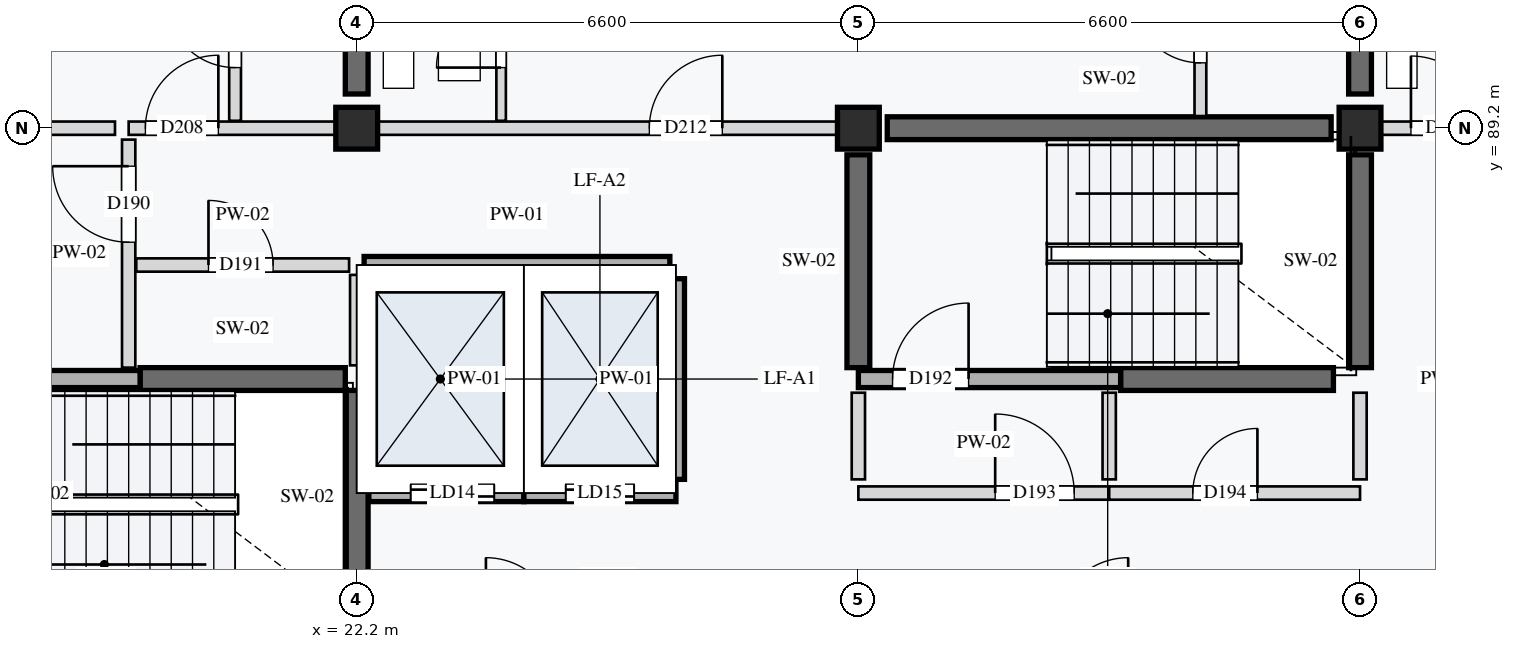
"""IFC4 building model, lengths in metres.
Left out: names, types, materials, properties, quantities, classifications, styles, units other than length and angle.
Written with IfcOpenShell. Run it as: python <this file> out.ifc"""

import sys

from ifc_helpers import new_model, si_unit, direction, frame, frame_2d, origin, origin_2d, place, context, subcontext, project, spatial, rectangle, extrude, element, fill, save


model = new_model("IFC4")
c1 = context("Model", 3, precision=1e-05, world=origin(), true_north=direction((0.0, 1.0)))
c2 = subcontext(c1, "Body", "Model", "MODEL_VIEW")
j1 = project(units=[si_unit("LENGTHUNIT", "METRE"), si_unit("PLANEANGLEUNIT", "RADIAN")], contexts=[c1])
p1 = place(None, origin())
s1 = spatial("IfcSite", under=j1, at=p1, CompositionType="ELEMENT")
p2 = place(p1, origin())
s2 = spatial("IfcBuilding", under=s1, at=p2, CompositionType="ELEMENT")
p3 = place(p2, frame((0.0, 0.0, 21.2)))
s3 = spatial("IfcBuildingStorey", under=s2, at=p3, CompositionType="ELEMENT", Elevation=21.2)
for number, where, z_axis, x_axis in (
    (1, (22.2, 89.2, 0.0), (0.0, 0.0, 1.0), (1.0, 0.0, 0.0)),
    (2, (28.8, 89.2, 0.0), (0.0, 0.0, 1.0), (1.0, 0.0, 0.0)),
    (3, (35.4, 89.2, 0.0), (0.0, 0.0, 1.0), (1.0, 0.0, 0.0)),
):
    element("IfcColumn", number, at=place(p3, frame(where, z_axis=z_axis, x_axis=x_axis)), inside=s3, PredefinedType="COLUMN", context=c2, shape_type="SweptSolid", body=[
        extrude(rectangle(XDim=0.55, YDim=0.55, at=origin_2d()), origin(), (0.0, 0.0, 1.0), 3.2),
    ])
p4 = place(p3, frame((19.35, 85.9, 0.0), z_axis=(0.0, 0.0, 1.0), x_axis=(1.0, 0.0, 0.0)))
e4 = element("IfcWall", 4, at=p4, inside=s3, PredefinedType="SHEAR", context=c2, shape_type="SweptSolid", body=[
    extrude(rectangle(XDim=2.7, YDim=0.3, at=frame_2d((1.35, 0.0))), origin(), (0.0, 0.0, 1.0), 2.96),
])
p5 = place(p3, frame((22.2, 82.95, 0.0), z_axis=(0.0, 0.0, 1.0), x_axis=(0.0, 1.0, 0.0)))
e5 = element("IfcWall", 5, at=p5, inside=s3, PredefinedType="SHEAR", context=c2, shape_type="SweptSolid", body=[
    extrude(rectangle(XDim=2.8, YDim=0.3, at=frame_2d((1.4, 0.0))), origin(), (0.0, 0.0, 1.0), 2.96),
])
p6 = place(p3, frame((29.18, 89.2, 0.0), z_axis=(0.0, 0.0, 1.0), x_axis=(1.0, 0.0, 0.0)))
e6 = element("IfcWall", 6, at=p6, inside=s3, PredefinedType="SHEAR", context=c2, shape_type="SweptSolid", body=[
    extrude(rectangle(XDim=5.84, YDim=0.3, at=frame_2d((2.92, 0.0))), origin(), (0.0, 0.0, 1.0), 2.96),
])
for number, where, z_axis, x_axis in (
    (7, (32.25, 85.9, 0.0), (0.0, 0.0, 1.0), (1.0, 0.0, 0.0)),
    (8, (28.8, 86.05, 0.0), (0.0, 0.0, 1.0), (0.0, 1.0, 0.0)),
    (9, (35.4, 86.05, 0.0), (0.0, 0.0, 1.0), (0.0, 1.0, 0.0)),
):
    element("IfcWall", number, at=place(p3, frame(where, z_axis=z_axis, x_axis=x_axis)), inside=s3, PredefinedType="SHEAR", context=c2, shape_type="SweptSolid", body=[
        extrude(rectangle(XDim=2.8, YDim=0.3, at=frame_2d((1.4, 0.0))), origin(), (0.0, 0.0, 1.0), 2.96),
    ])
for number, where, z_axis, x_axis in (
    (10, (22.2, 89.65, 0.0), (0.0, 0.0, 1.0), (0.0, 1.0, 0.0)),
    (11, (35.4, 89.65, 0.0), (0.0, 0.0, 1.0), (0.0, 1.0, 0.0)),
):
    element("IfcWall", number, at=place(p3, frame(where, z_axis=z_axis, x_axis=x_axis)), inside=s3, PredefinedType="SHEAR", context=c2, shape_type="SweptSolid", body=[
        extrude(rectangle(XDim=5.7, YDim=0.3, at=frame_2d((2.85, 0.0))), origin(), (0.0, 0.0, 1.0), 2.96),
    ])
p7 = place(p3, frame((15.75, 85.9, 0.0), z_axis=(0.0, 0.0, 1.0), x_axis=(1.0, 0.0, 0.0)))
e12 = element("IfcWall", 12, at=p7, inside=s3, PredefinedType="STANDARD", context=c2, shape_type="SweptSolid", body=[
    extrude(rectangle(XDim=3.6, YDim=0.225, at=frame_2d((1.8, 0.0))), origin(), (0.0, 0.0, 1.0), 2.96),
])
p8 = place(p7, frame((0.45, 0.0, 0.0)))
e13 = element("IfcOpeningElement", 13, at=p8, cuts=e12, PredefinedType="OPENING", context=c2, shape_type="SweptSolid", body=[
    extrude(rectangle(XDim=1.04, YDim=2.12, at=frame_2d((0.52, 1.06))), frame((0.0, 0.123, 0.0), z_axis=(0.0, -1.0, 0.0), x_axis=(1.0, 0.0, 0.0)), (0.0, 0.0, 1.0), 0.245),
])
p9 = place(p3, frame((19.2, 86.05, 0.0), z_axis=(0.0, 0.0, 1.0), x_axis=(0.0, 1.0, 0.0)))
e14 = element("IfcWall", 14, at=p9, inside=s3, PredefinedType="PARTITIONING", context=c2, shape_type="SweptSolid", body=[
    extrude(rectangle(XDim=3.0, YDim=0.175, at=frame_2d((1.5, 0.0))), origin(), (0.0, 0.0, 1.0), 2.96),
])
p10 = place(p9, frame((1.65, 0.0, 0.0)))
e15 = element("IfcOpeningElement", 15, at=p10, cuts=e14, PredefinedType="OPENING", context=c2, shape_type="SweptSolid", body=[
    extrude(rectangle(XDim=1.0, YDim=2.1, at=frame_2d((0.5, 1.05))), frame((0.0, 0.097, 0.0), z_axis=(0.0, -1.0, 0.0), x_axis=(1.0, 0.0, 0.0)), (0.0, 0.0, 1.0), 0.195),
])
p11 = place(p3, frame((19.3, 87.4, 0.0), z_axis=(0.0, 0.0, 1.0), x_axis=(1.0, 0.0, 0.0)))
e16 = element("IfcWall", 16, at=p11, inside=s3, PredefinedType="PARTITIONING", context=c2, shape_type="SweptSolid", body=[
    extrude(rectangle(XDim=2.8, YDim=0.175, at=frame_2d((1.4, 0.0))), origin(), (0.0, 0.0, 1.0), 2.96),
])
p12 = place(p11, frame((0.95, 0.0, 0.0)))
e17 = element("IfcOpeningElement", 17, at=p12, cuts=e16, PredefinedType="OPENING", context=c2, shape_type="SweptSolid", body=[
    extrude(rectangle(XDim=0.85, YDim=2.0, at=frame_2d((0.425, 1.0))), frame((0.0, 0.097, 0.0), z_axis=(0.0, -1.0, 0.0), x_axis=(1.0, 0.0, 0.0)), (0.0, 0.0, 1.0), 0.195),
])
p13 = place(p3, frame((22.2, 86.08, 0.0), z_axis=(0.0, 0.0, 1.0), x_axis=(0.0, 1.0, 0.0)))
e18 = element("IfcWall", 18, at=p13, inside=s3, PredefinedType="PARTITIONING", context=c2, shape_type="SweptSolid", body=[
    extrude(rectangle(XDim=1.19, YDim=0.175, at=frame_2d((0.595, 0.0))), origin(), (0.0, 0.0, 1.0), 2.96),
])
p14 = place(p3, frame((22.36, 84.4, 0.0), z_axis=(0.0, 0.0, 1.0), x_axis=(1.0, 0.0, 0.0)))
e19 = element("IfcWall", 19, at=p14, inside=s3, PredefinedType="STANDARD", context=c2, shape_type="SweptSolid", body=[
    extrude(rectangle(XDim=2.04, YDim=0.225, at=frame_2d((1.02, 0.0))), origin(), (0.0, 0.0, 1.0), 2.96),
])
p15 = place(p14, frame((0.55, 0.0, 0.0)))
e20 = element("IfcOpeningElement", 20, at=p15, cuts=e19, PredefinedType="OPENING", context=c2, shape_type="SweptSolid", body=[
    extrude(rectangle(XDim=1.1, YDim=2.1, at=frame_2d((0.55, 1.05))), frame((0.0, 0.123, 0.0), z_axis=(0.0, -1.0, 0.0), x_axis=(1.0, 0.0, 0.0)), (0.0, 0.0, 1.0), 0.245),
])
p16 = place(p3, frame((24.4, 84.4, 0.0), z_axis=(0.0, 0.0, 1.0), x_axis=(1.0, 0.0, 0.0)))
e21 = element("IfcWall", 21, at=p16, inside=s3, PredefinedType="STANDARD", context=c2, shape_type="SweptSolid", body=[
    extrude(rectangle(XDim=2.0, YDim=0.225, at=frame_2d((1.0, 0.0))), origin(), (0.0, 0.0, 1.0), 2.96),
])
p17 = place(p16, frame((0.55, 0.0, 0.0)))
e22 = element("IfcOpeningElement", 22, at=p17, cuts=e21, PredefinedType="OPENING", context=c2, shape_type="SweptSolid", body=[
    extrude(rectangle(XDim=0.9, YDim=2.1, at=frame_2d((0.45, 1.05))), frame((0.0, 0.123, 0.0), z_axis=(0.0, -1.0, 0.0), x_axis=(1.0, 0.0, 0.0)), (0.0, 0.0, 1.0), 0.245),
])
p18 = place(p3, frame((22.298, 87.4, 0.0), z_axis=(0.0, 0.0, 1.0), x_axis=(1.0, 0.0, 0.0)))
e23 = element("IfcWall", 23, at=p18, inside=s3, PredefinedType="STANDARD", context=c2, shape_type="SweptSolid", body=[
    extrude(rectangle(XDim=4.022, YDim=0.225, at=frame_2d((2.011, 0.0))), origin(), (0.0, 0.0, 1.0), 2.96),
])
for number, where, z_axis, x_axis in (
    (24, (24.4, 84.58, 0.0), (0.0, 0.0, 1.0), (0.0, 1.0, 0.0)),
    (25, (26.4, 84.58, 0.0), (0.0, 0.0, 1.0), (0.0, 1.0, 0.0)),
):
    element("IfcWall", number, at=place(p3, frame(where, z_axis=z_axis, x_axis=x_axis)), inside=s3, PredefinedType="STANDARD", context=c2, shape_type="SweptSolid", body=[
        extrude(rectangle(XDim=2.64, YDim=0.225, at=frame_2d((1.32, 0.0))), origin(), (0.0, 0.0, 1.0), 2.96),
    ])
p19 = place(p3, frame((28.8, 85.9, 0.0), z_axis=(0.0, 0.0, 1.0), x_axis=(1.0, 0.0, 0.0)))
e26 = element("IfcWall", 26, at=p19, inside=s3, PredefinedType="STANDARD", context=c2, shape_type="SweptSolid", body=[
    extrude(rectangle(XDim=3.45, YDim=0.225, at=frame_2d((1.725, 0.0))), origin(), (0.0, 0.0, 1.0), 2.96),
])
p20 = place(p19, frame((0.45, 0.0, 0.0)))
e27 = element("IfcOpeningElement", 27, at=p20, cuts=e26, PredefinedType="OPENING", context=c2, shape_type="SweptSolid", body=[
    extrude(rectangle(XDim=1.0, YDim=2.16, at=frame_2d((0.5, 1.08))), frame((0.0, 0.123, 0.0), z_axis=(0.0, -1.0, 0.0), x_axis=(1.0, 0.0, 0.0)), (0.0, 0.0, 1.0), 0.245),
])
p21 = place(p3, frame((28.8, 84.4, 0.0), z_axis=(0.0, 0.0, 1.0), x_axis=(1.0, 0.0, 0.0)))
e28 = element("IfcWall", 28, at=p21, inside=s3, PredefinedType="PARTITIONING", context=c2, shape_type="SweptSolid", body=[
    extrude(rectangle(XDim=3.3, YDim=0.175, at=frame_2d((1.65, 0.0))), origin(), (0.0, 0.0, 1.0), 2.96),
])
p22 = place(p21, frame((1.8, 0.0, 0.0)))
e29 = element("IfcOpeningElement", 29, at=p22, cuts=e28, PredefinedType="OPENING", context=c2, shape_type="SweptSolid", body=[
    extrude(rectangle(XDim=1.04, YDim=2.12, at=frame_2d((0.52, 1.06))), frame((0.0, 0.097, 0.0), z_axis=(0.0, -1.0, 0.0), x_axis=(1.0, 0.0, 0.0)), (0.0, 0.0, 1.0), 0.195),
])
p23 = place(p3, frame((32.1, 84.4, 0.0), z_axis=(0.0, 0.0, 1.0), x_axis=(1.0, 0.0, 0.0)))
e30 = element("IfcWall", 30, at=p23, inside=s3, PredefinedType="PARTITIONING", context=c2, shape_type="SweptSolid", body=[
    extrude(rectangle(XDim=3.3, YDim=0.175, at=frame_2d((1.65, 0.0))), origin(), (0.0, 0.0, 1.0), 2.96),
])
p24 = place(p23, frame((1.1, 0.0, 0.0)))
e31 = element("IfcOpeningElement", 31, at=p24, cuts=e30, PredefinedType="OPENING", context=c2, shape_type="SweptSolid", body=[
    extrude(rectangle(XDim=0.85, YDim=2.0, at=frame_2d((0.425, 1.0))), frame((0.0, 0.097, 0.0), z_axis=(0.0, -1.0, 0.0), x_axis=(1.0, 0.0, 0.0)), (0.0, 0.0, 1.0), 0.195),
])
for number, where, z_axis, x_axis in (
    (32, (28.8, 84.58, 0.0), (0.0, 0.0, 1.0), (0.0, 1.0, 0.0)),
    (33, (32.1, 84.58, 0.0), (0.0, 0.0, 1.0), (0.0, 1.0, 0.0)),
    (34, (35.4, 84.58, 0.0), (0.0, 0.0, 1.0), (0.0, 1.0, 0.0)),
):
    element("IfcWall", number, at=place(p3, frame(where, z_axis=z_axis, x_axis=x_axis)), inside=s3, PredefinedType="PARTITIONING", context=c2, shape_type="SweptSolid", body=[
        extrude(rectangle(XDim=1.14, YDim=0.175, at=frame_2d((0.57, 0.0))), origin(), (0.0, 0.0, 1.0), 2.96),
    ])
p25 = place(p3, frame((15.88, 89.2, 0.0), z_axis=(0.0, 0.0, 1.0), x_axis=(1.0, 0.0, 0.0)))
e35 = element("IfcWall", 35, at=p25, inside=s3, PredefinedType="PARTITIONING", context=c2, shape_type="SweptSolid", body=[
    extrude(rectangle(XDim=3.14, YDim=0.175, at=frame_2d((1.57, 0.0))), origin(), (0.0, 0.0, 1.0), 2.55),
])
p26 = place(p3, frame((19.2, 89.2, 0.0), z_axis=(0.0, 0.0, 1.0), x_axis=(1.0, 0.0, 0.0)))
e36 = element("IfcWall", 36, at=p26, inside=s3, PredefinedType="PARTITIONING", context=c2, shape_type="SweptSolid", body=[
    extrude(rectangle(XDim=3.0, YDim=0.175, at=frame_2d((1.5, 0.0))), origin(), (0.0, 0.0, 1.0), 2.55),
])
p27 = place(p26, frame((0.22, 0.0, 0.0)))
e37 = element("IfcOpeningElement", 37, at=p27, cuts=e36, PredefinedType="OPENING", context=c2, shape_type="SweptSolid", body=[
    extrude(rectangle(XDim=0.96, YDim=2.18, at=frame_2d((0.48, 1.09))), frame((0.0, 0.097, 0.0), z_axis=(0.0, -1.0, 0.0), x_axis=(1.0, 0.0, 0.0)), (0.0, 0.0, 1.0), 0.195),
])
p28 = place(p3, frame((20.6, 89.298, 0.0), z_axis=(0.0, 0.0, 1.0), x_axis=(0.0, 1.0, 0.0)))
e38 = element("IfcWall", 38, at=p28, inside=s3, PredefinedType="PARTITIONING", context=c2, shape_type="SweptSolid", body=[
    extrude(rectangle(XDim=2.302, YDim=0.155, at=frame_2d((1.151, 0.0))), origin(), (0.0, 0.0, 1.0), 2.96),
])
p29 = place(p28, frame((0.7, 0.0, 0.0)))
e39 = element("IfcOpeningElement", 39, at=p29, cuts=e38, PredefinedType="OPENING", context=c2, shape_type="SweptSolid", body=[
    extrude(rectangle(XDim=0.9, YDim=2.1, at=frame_2d((0.45, 1.05))), frame((0.0, 0.087, 0.0), z_axis=(0.0, -1.0, 0.0), x_axis=(1.0, 0.0, 0.0)), (0.0, 0.0, 1.0), 0.175),
])
p30 = place(p3, frame((22.2, 89.2, 0.0), z_axis=(0.0, 0.0, 1.0), x_axis=(1.0, 0.0, 0.0)))
e40 = element("IfcWall", 40, at=p30, inside=s3, PredefinedType="PARTITIONING", context=c2, shape_type="SweptSolid", body=[
    extrude(rectangle(XDim=6.6, YDim=0.175, at=frame_2d((3.3, 0.0))), origin(), (0.0, 0.0, 1.0), 2.55),
])
p31 = place(p30, frame((3.85, 0.0, 0.0)))
e41 = element("IfcOpeningElement", 41, at=p31, cuts=e40, PredefinedType="OPENING", context=c2, shape_type="SweptSolid", body=[
    extrude(rectangle(XDim=0.96, YDim=2.18, at=frame_2d((0.48, 1.09))), frame((0.0, 0.097, 0.0), z_axis=(0.0, -1.0, 0.0), x_axis=(1.0, 0.0, 0.0)), (0.0, 0.0, 1.0), 0.195),
])
p32 = place(p3, frame((24.1, 89.298, 0.0), z_axis=(0.0, 0.0, 1.0), x_axis=(0.0, 1.0, 0.0)))
e42 = element("IfcWall", 42, at=p32, inside=s3, PredefinedType="PARTITIONING", context=c2, shape_type="SweptSolid", body=[
    extrude(rectangle(XDim=2.302, YDim=0.125, at=frame_2d((1.151, 0.0))), origin(), (0.0, 0.0, 1.0), 2.96),
])
p33 = place(p32, frame((0.7, 0.0, 0.0)))
e43 = element("IfcOpeningElement", 43, at=p33, cuts=e42, PredefinedType="OPENING", context=c2, shape_type="SweptSolid", body=[
    extrude(rectangle(XDim=0.85, YDim=2.04, at=frame_2d((0.425, 1.02))), frame((0.0, 0.073, 0.0), z_axis=(0.0, -1.0, 0.0), x_axis=(1.0, 0.0, 0.0)), (0.0, 0.0, 1.0), 0.145),
])
p34 = place(p3, frame((33.3, 89.36, 0.0), z_axis=(0.0, 0.0, 1.0), x_axis=(0.0, 1.0, 0.0)))
e44 = element("IfcWall", 44, at=p34, inside=s3, PredefinedType="PARTITIONING", context=c2, shape_type="SweptSolid", body=[
    extrude(rectangle(XDim=2.24, YDim=0.155, at=frame_2d((1.12, 0.0))), origin(), (0.0, 0.0, 1.0), 2.96),
])
p35 = place(p34, frame((0.7, 0.0, 0.0)))
e45 = element("IfcOpeningElement", 45, at=p35, cuts=e44, PredefinedType="OPENING", context=c2, shape_type="SweptSolid", body=[
    extrude(rectangle(XDim=0.88, YDim=2.16, at=frame_2d((0.44, 1.08))), frame((0.0, 0.087, 0.0), z_axis=(0.0, -1.0, 0.0), x_axis=(1.0, 0.0, 0.0)), (0.0, 0.0, 1.0), 0.175),
])
p36 = place(p3, frame((35.4, 89.2, 0.0), z_axis=(0.0, 0.0, 1.0), x_axis=(1.0, 0.0, 0.0)))
e46 = element("IfcWall", 46, at=p36, inside=s3, PredefinedType="PARTITIONING", context=c2, shape_type="SweptSolid", body=[
    extrude(rectangle(XDim=13.2, YDim=0.175, at=frame_2d((6.6, 0.0))), origin(), (0.0, 0.0, 1.0), 2.55),
])
p37 = place(p36, frame((0.67, 0.0, 0.0)))
e47 = element("IfcOpeningElement", 47, at=p37, cuts=e46, PredefinedType="OPENING", context=c2, shape_type="SweptSolid", body=[
    extrude(rectangle(XDim=0.95, YDim=2.1, at=frame_2d((0.475, 1.05))), frame((0.0, 0.097, 0.0), z_axis=(0.0, -1.0, 0.0), x_axis=(1.0, 0.0, 0.0)), (0.0, 0.0, 1.0), 0.195),
])
p38 = place(p10, origin())
e48 = element("IfcDoor", 48, at=p38, inside=s3, OperationType="SINGLE_SWING_RIGHT", PredefinedType="DOOR", context=c2, shape_type="SweptSolid", body=[
    extrude(rectangle(XDim=1.0, YDim=2.1, at=frame_2d((0.5, 1.05))), frame((0.0, 0.025, 0.0), z_axis=(0.0, -1.0, 0.0), x_axis=(1.0, 0.0, 0.0)), (0.0, 0.0, 1.0), 0.05),
])
fill(e15, e48)
p39 = place(p12, origin())
e49 = element("IfcDoor", 49, at=p39, inside=s3, OperationType="SINGLE_SWING_LEFT", PredefinedType="DOOR", context=c2, shape_type="SweptSolid", body=[
    extrude(rectangle(XDim=0.85, YDim=2.0, at=frame_2d((0.425, 1.0))), frame((0.0, 0.025, 0.0), z_axis=(0.0, -1.0, 0.0), x_axis=(1.0, 0.0, 0.0)), (0.0, 0.0, 1.0), 0.05),
])
fill(e17, e49)
p40 = place(p15, origin())
e50 = element("IfcDoor", 50, at=p40, inside=s3, OperationType="DOUBLE_DOOR_SLIDING", PredefinedType="DOOR", context=c2, shape_type="SweptSolid", body=[
    extrude(rectangle(XDim=1.1, YDim=2.1, at=frame_2d((0.55, 1.05))), frame((0.0, 0.025, 0.0), z_axis=(0.0, -1.0, 0.0), x_axis=(1.0, 0.0, 0.0)), (0.0, 0.0, 1.0), 0.05),
])
fill(e20, e50)
p41 = place(p17, origin())
e51 = element("IfcDoor", 51, at=p41, inside=s3, OperationType="DOUBLE_DOOR_SLIDING", PredefinedType="DOOR", context=c2, shape_type="SweptSolid", body=[
    extrude(rectangle(XDim=0.9, YDim=2.1, at=frame_2d((0.45, 1.05))), frame((0.0, 0.025, 0.0), z_axis=(0.0, -1.0, 0.0), x_axis=(1.0, 0.0, 0.0)), (0.0, 0.0, 1.0), 0.05),
])
fill(e22, e51)
p42 = place(p20, origin())
e52 = element("IfcDoor", 52, at=p42, inside=s3, OperationType="SINGLE_SWING_RIGHT", PredefinedType="DOOR", context=c2, shape_type="SweptSolid", body=[
    extrude(rectangle(XDim=1.0, YDim=2.16, at=frame_2d((0.5, 1.08))), frame((0.0, 0.025, 0.0), z_axis=(0.0, -1.0, 0.0), x_axis=(1.0, 0.0, 0.0)), (0.0, 0.0, 1.0), 0.05),
])
fill(e27, e52)
p43 = place(p22, origin())
e53 = element("IfcDoor", 53, at=p43, inside=s3, OperationType="SINGLE_SWING_LEFT", PredefinedType="DOOR", context=c2, shape_type="SweptSolid", body=[
    extrude(rectangle(XDim=1.04, YDim=2.12, at=frame_2d((0.52, 1.06))), frame((0.0, 0.025, 0.0), z_axis=(0.0, -1.0, 0.0), x_axis=(1.0, 0.0, 0.0)), (0.0, 0.0, 1.0), 0.05),
])
fill(e29, e53)
p44 = place(p24, origin())
e54 = element("IfcDoor", 54, at=p44, inside=s3, OperationType="SINGLE_SWING_RIGHT", PredefinedType="DOOR", context=c2, shape_type="SweptSolid", body=[
    extrude(rectangle(XDim=0.85, YDim=2.0, at=frame_2d((0.425, 1.0))), frame((0.0, 0.025, 0.0), z_axis=(0.0, -1.0, 0.0), x_axis=(1.0, 0.0, 0.0)), (0.0, 0.0, 1.0), 0.05),
])
fill(e31, e54)
p45 = place(p27, origin())
e55 = element("IfcDoor", 55, at=p45, inside=s3, OperationType="SINGLE_SWING_RIGHT", PredefinedType="DOOR", context=c2, shape_type="SweptSolid", body=[
    extrude(rectangle(XDim=0.96, YDim=2.18, at=frame_2d((0.48, 1.09))), frame((0.0, 0.025, 0.0), z_axis=(0.0, -1.0, 0.0), x_axis=(1.0, 0.0, 0.0)), (0.0, 0.0, 1.0), 0.05),
])
fill(e37, e55)
p46 = place(p29, origin())
e56 = element("IfcDoor", 56, at=p46, inside=s3, OperationType="SINGLE_SWING_RIGHT", PredefinedType="DOOR", context=c2, shape_type="SweptSolid", body=[
    extrude(rectangle(XDim=0.9, YDim=2.1, at=frame_2d((0.45, 1.05))), frame((0.0, 0.025, 0.0), z_axis=(0.0, -1.0, 0.0), x_axis=(1.0, 0.0, 0.0)), (0.0, 0.0, 1.0), 0.05),
])
fill(e39, e56)
p47 = place(p31, origin())
e57 = element("IfcDoor", 57, at=p47, inside=s3, OperationType="SINGLE_SWING_RIGHT", PredefinedType="DOOR", context=c2, shape_type="SweptSolid", body=[
    extrude(rectangle(XDim=0.96, YDim=2.18, at=frame_2d((0.48, 1.09))), frame((0.0, 0.025, 0.0), z_axis=(0.0, -1.0, 0.0), x_axis=(1.0, 0.0, 0.0)), (0.0, 0.0, 1.0), 0.05),
])
fill(e41, e57)
p48 = place(p33, origin())
e58 = element("IfcDoor", 58, at=p48, inside=s3, OperationType="SINGLE_SWING_LEFT", PredefinedType="DOOR", context=c2, shape_type="SweptSolid", body=[
    extrude(rectangle(XDim=0.85, YDim=2.04, at=frame_2d((0.425, 1.02))), frame((0.0, 0.025, 0.0), z_axis=(0.0, -1.0, 0.0), x_axis=(1.0, 0.0, 0.0)), (0.0, 0.0, 1.0), 0.05),
])
fill(e43, e58)
p49 = place(p35, origin())
e59 = element("IfcDoor", 59, at=p49, inside=s3, OperationType="SINGLE_SWING_RIGHT", PredefinedType="DOOR", context=c2, shape_type="SweptSolid", body=[
    extrude(rectangle(XDim=0.88, YDim=2.16, at=frame_2d((0.44, 1.08))), frame((0.0, 0.025, 0.0), z_axis=(0.0, -1.0, 0.0), x_axis=(1.0, 0.0, 0.0)), (0.0, 0.0, 1.0), 0.05),
])
fill(e45, e59)
p50 = place(p37, origin())
e60 = element("IfcDoor", 60, at=p50, inside=s3, OperationType="SINGLE_SWING_LEFT", PredefinedType="DOOR", context=c2, shape_type="SweptSolid", body=[
    extrude(rectangle(XDim=0.95, YDim=2.1, at=frame_2d((0.475, 1.05))), frame((0.0, 0.025, 0.0), z_axis=(0.0, -1.0, 0.0), x_axis=(1.0, 0.0, 0.0)), (0.0, 0.0, 1.0), 0.05),
])
fill(e47, e60)
save(model, sys.argv[1])
